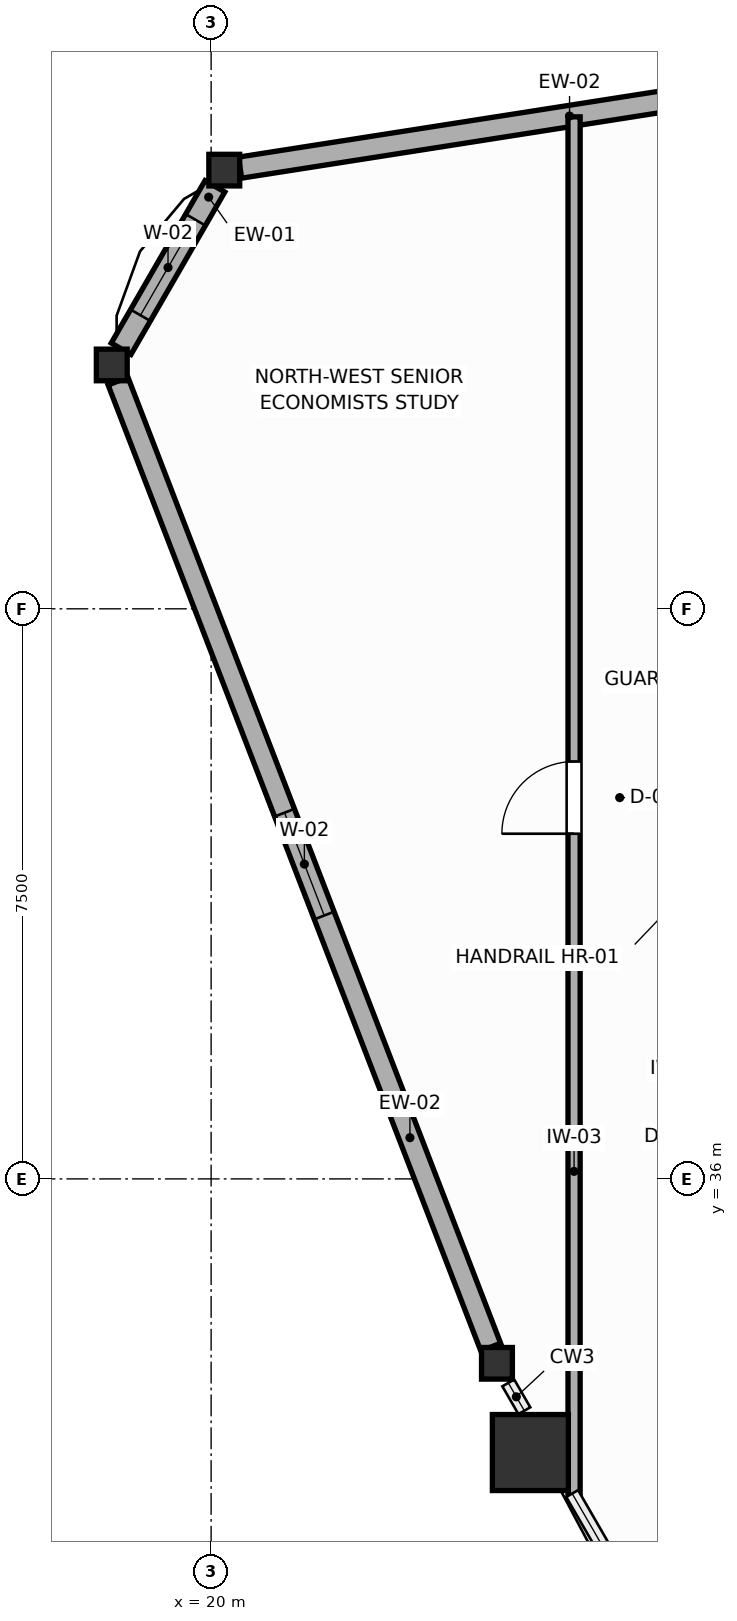
"""IFC4 building model, lengths in metres.
Left out: names, types, materials, properties, quantities, classifications, styles, units other than length and angle.
Written with IfcOpenShell. Run it as: python <this file> out.ifc"""

import sys

from ifc_helpers import new_model, si_unit, direction, frame, frame_2d, origin, origin_2d, place, context, subcontext, project, spatial, rectangle, i_section, extrude, source, transform, mapped, element, fill, save


model = new_model("IFC4")
c1 = context("Model", 3, precision=1e-05, world=origin(), true_north=direction((0.0, 1.0)))
c2 = subcontext(c1, "Body", "Model", "MODEL_VIEW")
j1 = project(units=[si_unit("LENGTHUNIT", "METRE"), si_unit("PLANEANGLEUNIT", "RADIAN")], contexts=[c1])
p1 = place(None, origin())
s1 = spatial("IfcSite", under=j1, at=p1, CompositionType="ELEMENT")
p2 = place(p1, origin())
s2 = spatial("IfcBuilding", under=s1, at=p2, CompositionType="ELEMENT")
p3 = place(p2, frame((0.0, 0.0, 216.6)))
s3 = spatial("IfcBuildingStorey", under=s2, at=p3, CompositionType="ELEMENT", Elevation=216.6)
m1 = source(origin(), c2, "Body", "SweptSolid", [
    extrude(rectangle(XDim=1.0, YDim=1.0, at=origin_2d()), origin(), (0.0, 0.0, 1.0), 3.6),
])
p4 = place(p3, frame((24.2, 32.4, 0.0), z_axis=(0.0, 0.0, 1.0), x_axis=(1.0, 0.0, 0.0)))
e1 = element("IfcColumn", 1, at=p4, inside=s3, PredefinedType="COLUMN", context=c2, shape_type="MappedRepresentation", body=[
    mapped(m1, transform((0.0, 0.0, 0.0), scale=1.0)),
])
m2 = source(origin(), c2, "Body", "SweptSolid", [
    extrude(i_section(OverallWidth=0.406, OverallDepth=0.416, WebThickness=0.027, FlangeThickness=0.044, FilletRadius=0.015, at=origin_2d()), origin(), (0.0, 0.0, 1.0), 3.6),
])
for number, where, z_axis, x_axis in (
    (2, (20.173, 49.271, 0.0), (0.0, 0.0, 1.0), (1.0, 0.0, 0.0)),
    (3, (18.693, 46.708, 0.0), (0.0, 0.0, 1.0), (1.0, 0.0, 0.0)),
    (4, (23.76, 33.574, 0.0), (0.0, 0.0, 1.0), (1.0, 0.0, 0.0)),
):
    element("IfcColumn", number, at=place(p3, frame(where, z_axis=z_axis, x_axis=x_axis)), inside=s3, PredefinedType="COLUMN", context=c2, shape_type="MappedRepresentation", body=[
        mapped(m2, transform((0.0, 0.0, 0.0), scale=1.0)),
    ])
p5 = place(p3, frame((33.873, 51.417, 0.0), z_axis=(0.0, 0.0, 1.0), x_axis=(-0.987957437721, -0.154725890697, 0.0)))
e5 = element("IfcWall", 5, at=p5, inside=s3, PredefinedType="SOLIDWALL", context=c2, shape_type="SweptSolid", body=[
    extrude(rectangle(XDim=13.657, YDim=0.28, at=frame_2d((6.828, 0.0))), origin(), (0.0, 0.0, 1.0), 2.96),
])
p6 = place(p5, frame((3.252, 0.0, 0.75)))
e6 = element("IfcOpeningElement", 6, at=p6, cuts=e5, PredefinedType="OPENING", context=c2, shape_type="SweptSolid", body=[
    extrude(rectangle(XDim=1.45, YDim=1.65, at=frame_2d((0.725, 0.825))), frame((0.0, 0.15, 0.0), z_axis=(0.0, -1.0, 0.0), x_axis=(1.0, 0.0, 0.0)), (0.0, 0.0, 1.0), 0.3),
])
p7 = place(p3, frame((20.05, 49.059, 0.0), z_axis=(0.0, 0.0, 1.0), x_axis=(-0.499990780478, -0.866030726613, 0.0)))
e7 = element("IfcWall", 7, at=p7, inside=s3, PredefinedType="SOLIDWALL", context=c2, shape_type="SweptSolid", body=[
    extrude(rectangle(XDim=2.468, YDim=0.3, at=frame_2d((1.234, 0.0))), origin(), (0.0, 0.0, 1.0), 3.02),
])
p8 = place(p7, frame((0.509, 0.0, 0.75)))
e8 = element("IfcOpeningElement", 8, at=p8, cuts=e7, PredefinedType="OPENING", context=c2, shape_type="SweptSolid", body=[
    extrude(rectangle(XDim=1.45, YDim=1.65, at=frame_2d((0.725, 0.825))), frame((0.0, 0.16, 0.0), z_axis=(0.0, -1.0, 0.0), x_axis=(1.0, 0.0, 0.0)), (0.0, 0.0, 1.0), 0.32),
])
p9 = place(p3, frame((18.775, 46.495, 0.0), z_axis=(0.0, 0.0, 1.0), x_axis=(0.359956541612, -0.93296907138, 0.0)))
e9 = element("IfcWall", 9, at=p9, inside=s3, PredefinedType="SOLIDWALL", context=c2, shape_type="SweptSolid", body=[
    extrude(rectangle(XDim=13.621, YDim=0.28, at=frame_2d((6.811, 0.0))), origin(), (0.0, 0.0, 1.0), 3.02),
])
p10 = place(p9, frame((6.086, 0.0, 0.75)))
e10 = element("IfcOpeningElement", 10, at=p10, cuts=e9, PredefinedType="OPENING", context=c2, shape_type="SweptSolid", body=[
    extrude(rectangle(XDim=1.45, YDim=1.65, at=frame_2d((0.725, 0.825))), frame((0.0, 0.15, 0.0), z_axis=(0.0, -1.0, 0.0), x_axis=(1.0, 0.0, 0.0)), (0.0, 0.0, 1.0), 0.3),
])
p11 = place(p3, frame((24.775, 31.837, 0.0), z_axis=(0.0, 0.0, 1.0), x_axis=(0.0, 1.0, 0.0)))
e11 = element("IfcWall", 11, at=p11, inside=s3, PredefinedType="PARTITIONING", context=c2, shape_type="SweptSolid", body=[
    extrude(rectangle(XDim=18.135, YDim=0.16, at=frame_2d((9.068, 0.0))), origin(), (0.0, 0.0, 1.0), 3.41),
])
p12 = place(p11, frame((8.704, 0.0, 0.0)))
e12 = element("IfcOpeningElement", 12, at=p12, cuts=e11, PredefinedType="OPENING", context=c2, shape_type="SweptSolid", body=[
    extrude(rectangle(XDim=0.95, YDim=2.05, at=frame_2d((0.475, 1.025))), frame((0.0, 0.09, 0.0), z_axis=(0.0, -1.0, 0.0), x_axis=(1.0, 0.0, 0.0)), (0.0, 0.0, 1.0), 0.18),
])
p13 = place(p8, origin())
e13 = element("IfcWindow", 13, at=p13, inside=s3, PartitioningType="SINGLE_PANEL", PredefinedType="WINDOW", context=c2, shape_type="SweptSolid", body=[
    extrude(rectangle(XDim=1.45, YDim=1.65, at=frame_2d((0.725, 0.825))), frame((0.0, 0.03, 0.0), z_axis=(0.0, -1.0, 0.0), x_axis=(1.0, 0.0, 0.0)), (0.0, 0.0, 1.0), 0.06),
])
fill(e8, e13)
p14 = place(p10, origin())
e14 = element("IfcWindow", 14, at=p14, inside=s3, PartitioningType="SINGLE_PANEL", PredefinedType="WINDOW", context=c2, shape_type="SweptSolid", body=[
    extrude(rectangle(XDim=1.45, YDim=1.65, at=frame_2d((0.725, 0.825))), frame((0.0, 0.03, 0.0), z_axis=(0.0, -1.0, 0.0), x_axis=(1.0, 0.0, 0.0)), (0.0, 0.0, 1.0), 0.06),
])
fill(e10, e14)
p15 = place(p12, origin())
e15 = element("IfcDoor", 15, at=p15, inside=s3, OperationType="SINGLE_SWING_LEFT", PredefinedType="DOOR", context=c2, shape_type="SweptSolid", body=[
    extrude(rectangle(XDim=0.95, YDim=2.05, at=frame_2d((0.475, 1.025))), frame((0.0, 0.025, 0.0), z_axis=(0.0, -1.0, 0.0), x_axis=(1.0, 0.0, 0.0)), (0.0, 0.0, 1.0), 0.05),
])
fill(e12, e15)
save(model, sys.argv[1])
